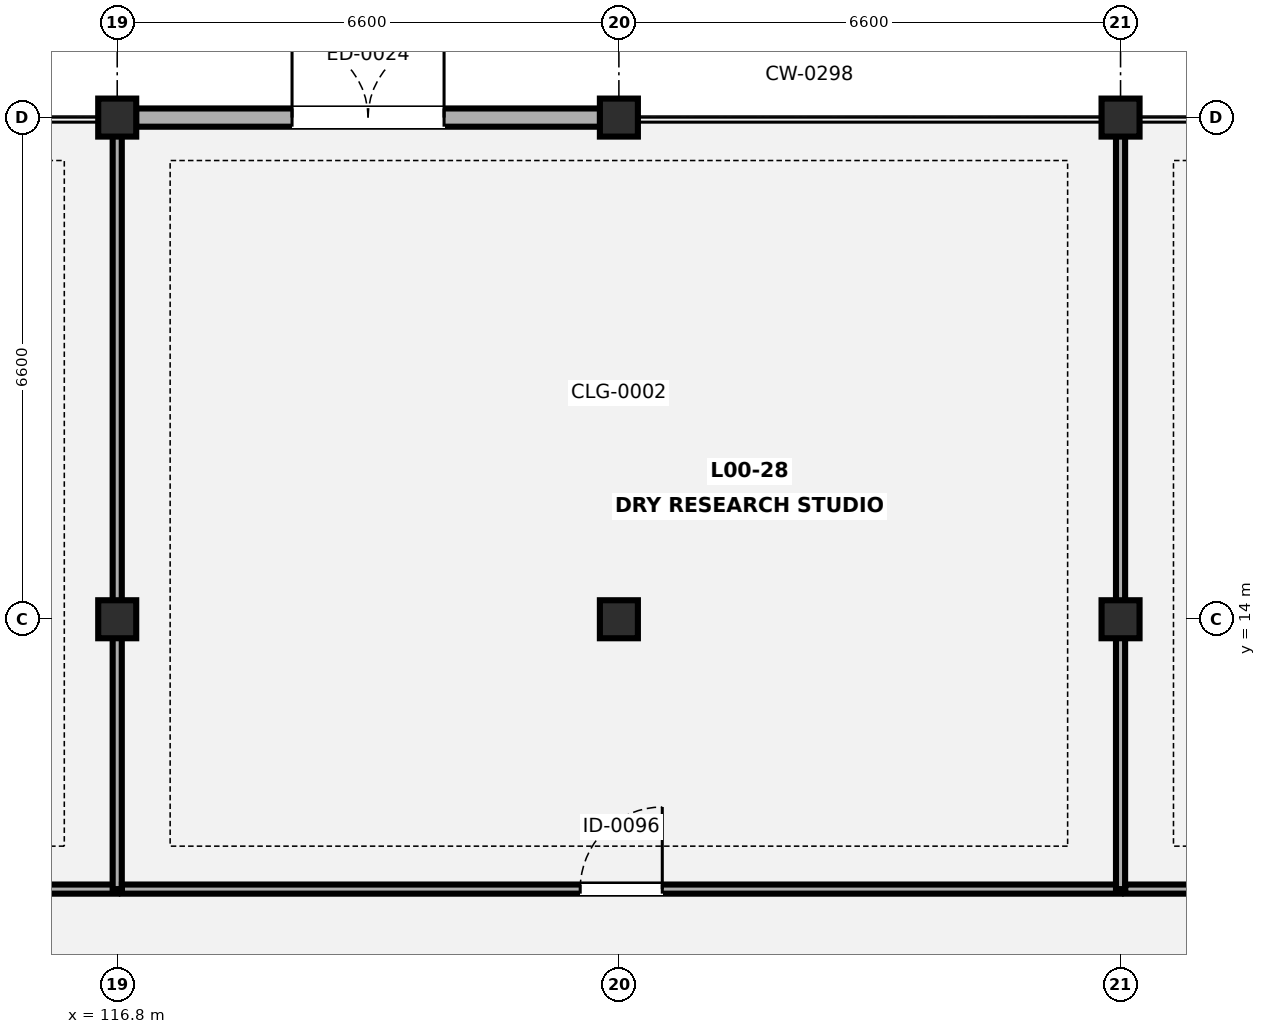
"""IFC4 building model, lengths in metres.
Left out: names, types, materials, properties, quantities, classifications, styles, units other than length and angle.
Written with IfcOpenShell. Run it as: python <this file> out.ifc"""

import sys

from ifc_helpers import new_model, si_unit, direction, frame, frame_2d, origin, origin_2d, place, context, subcontext, project, spatial, rectangle, i_section, extrude, element, fill, save


model = new_model("IFC4")
c1 = context("Model", 3, precision=1e-05, world=origin(), true_north=direction((0.0, 1.0)))
c2 = subcontext(c1, "Body", "Model", "MODEL_VIEW")
j1 = project(units=[si_unit("LENGTHUNIT", "METRE"), si_unit("PLANEANGLEUNIT", "RADIAN")], contexts=[c1])
p1 = place(None, origin())
s1 = spatial("IfcSite", under=j1, at=p1, CompositionType="ELEMENT")
p2 = place(p1, origin())
s2 = spatial("IfcBuilding", under=s1, at=p2, CompositionType="ELEMENT")
p3 = place(p2, origin())
s3 = spatial("IfcBuildingStorey", under=s2, at=p3, CompositionType="ELEMENT", Elevation=0.0)
for number, where, z_axis, x_axis in (
    (1, (116.8, 14.0, 0.0), (0.0, 0.0, 1.0), (1.0, 0.0, 0.0)),
    (2, (116.8, 20.6, 0.0), (0.0, 0.0, 1.0), (1.0, 0.0, 0.0)),
    (3, (123.4, 14.0, 0.0), (0.0, 0.0, 1.0), (1.0, 0.0, 0.0)),
    (4, (123.4, 20.6, 0.0), (0.0, 0.0, 1.0), (1.0, 0.0, 0.0)),
    (5, (130.0, 14.0, 0.0), (0.0, 0.0, 1.0), (1.0, 0.0, 0.0)),
    (6, (130.0, 20.6, 0.0), (0.0, 0.0, 1.0), (1.0, 0.0, 0.0)),
):
    element("IfcColumn", number, at=place(p3, frame(where, z_axis=z_axis, x_axis=x_axis)), inside=s3, PredefinedType="COLUMN", context=c2, shape_type="SweptSolid", body=[
        extrude(i_section(OverallWidth=0.5, OverallDepth=0.5, WebThickness=0.022, FlangeThickness=0.04, FilletRadius=0.016, at=origin_2d()), origin(), (0.0, 0.0, 1.0), 4.9),
    ])
p4 = place(p3, frame((117.048, 20.6, 0.0), z_axis=(0.0, 0.0, 1.0), x_axis=(1.0, 0.0, 0.0)))
e7 = element("IfcWall", 7, at=p4, inside=s3, PredefinedType="SOLIDWALL", context=c2, shape_type="SweptSolid", body=[
    extrude(rectangle(XDim=6.104, YDim=0.24, at=frame_2d((3.052, 0.0))), origin(), (0.0, 0.0, 1.0), 4.205),
])
p5 = place(p4, frame((2.052, 0.0, 0.0)))
e8 = element("IfcOpeningElement", 8, at=p5, cuts=e7, PredefinedType="OPENING", context=c2, shape_type="SweptSolid", body=[
    extrude(rectangle(XDim=2.0, YDim=2.25, at=frame_2d((1.0, 1.125))), frame((0.0, 0.13, 0.0), z_axis=(0.0, -1.0, 0.0), x_axis=(1.0, 0.0, 0.0)), (0.0, 0.0, 1.0), 0.26),
])
p6 = place(p3, frame((103.6, 10.45, 0.0), z_axis=(0.0, 0.0, 1.0), x_axis=(1.0, 0.0, 0.0)))
e9 = element("IfcWall", 9, at=p6, inside=s3, PredefinedType="PARTITIONING", context=c2, shape_type="SweptSolid", body=[
    extrude(rectangle(XDim=13.2, YDim=0.12, at=frame_2d((6.6, 0.0))), origin(), (0.0, 0.0, 1.0), 4.246),
])
p7 = place(p6, frame((6.125, 0.0, 0.0)))
e10 = element("IfcOpeningElement", 10, at=p7, cuts=e9, PredefinedType="OPENING", context=c2, shape_type="SweptSolid", body=[
    extrude(rectangle(XDim=0.95, YDim=2.1, at=frame_2d((0.475, 1.05))), frame((0.0, 0.07, 0.0), z_axis=(0.0, -1.0, 0.0), x_axis=(1.0, 0.0, 0.0)), (0.0, 0.0, 1.0), 0.14),
])
p8 = place(p3, frame((116.8, 10.45, 0.0), z_axis=(0.0, 0.0, 1.0), x_axis=(0.0, 1.0, 0.0)))
e11 = element("IfcWall", 11, at=p8, inside=s3, PredefinedType="PARTITIONING", context=c2, shape_type="SweptSolid", body=[
    extrude(rectangle(XDim=10.028, YDim=0.12, at=frame_2d((5.014, 0.0))), origin(), (0.0, 0.0, 1.0), 4.072),
])
p9 = place(p3, frame((116.862, 10.45, 0.0), z_axis=(0.0, 0.0, 1.0), x_axis=(1.0, 0.0, 0.0)))
e12 = element("IfcWall", 12, at=p9, inside=s3, PredefinedType="PARTITIONING", context=c2, shape_type="SweptSolid", body=[
    extrude(rectangle(XDim=13.138, YDim=0.12, at=frame_2d((6.569, 0.0))), origin(), (0.0, 0.0, 1.0), 4.246),
])
p10 = place(p9, frame((6.029, 0.0, 0.0)))
e13 = element("IfcOpeningElement", 13, at=p10, cuts=e12, PredefinedType="OPENING", context=c2, shape_type="SweptSolid", body=[
    extrude(rectangle(XDim=1.08, YDim=2.12, at=frame_2d((0.54, 1.06))), frame((0.0, 0.07, 0.0), z_axis=(0.0, -1.0, 0.0), x_axis=(1.0, 0.0, 0.0)), (0.0, 0.0, 1.0), 0.14),
])
p11 = place(p3, frame((130.0, 10.45, 0.0), z_axis=(0.0, 0.0, 1.0), x_axis=(0.0, 1.0, 0.0)))
e14 = element("IfcWall", 14, at=p11, inside=s3, PredefinedType="PARTITIONING", context=c2, shape_type="SweptSolid", body=[
    extrude(rectangle(XDim=10.15, YDim=0.12, at=frame_2d((5.075, 0.0))), origin(), (0.0, 0.0, 1.0), 4.072),
])
p12 = place(p3, frame((130.062, 10.45, 0.0), z_axis=(0.0, 0.0, 1.0), x_axis=(1.0, 0.0, 0.0)))
e15 = element("IfcWall", 15, at=p12, inside=s3, PredefinedType="PARTITIONING", context=c2, shape_type="SweptSolid", body=[
    extrude(rectangle(XDim=13.138, YDim=0.12, at=frame_2d((6.569, 0.0))), origin(), (0.0, 0.0, 1.0), 4.246),
])
p13 = place(p12, frame((5.844, 0.0, 0.0)))
e16 = element("IfcOpeningElement", 16, at=p13, cuts=e15, PredefinedType="OPENING", context=c2, shape_type="SweptSolid", body=[
    extrude(rectangle(XDim=1.45, YDim=2.12, at=frame_2d((0.725, 1.06))), frame((0.0, 0.07, 0.0), z_axis=(0.0, -1.0, 0.0), x_axis=(1.0, 0.0, 0.0)), (0.0, 0.0, 1.0), 0.14),
])
p14 = place(p5, origin())
e17 = element("IfcDoor", 17, at=p14, inside=s3, OperationType="DOUBLE_DOOR_SINGLE_SWING", PredefinedType="DOOR", context=c2, shape_type="SweptSolid", body=[
    extrude(rectangle(XDim=2.0, YDim=2.25, at=frame_2d((1.0, 1.125))), frame((0.0, 0.025, 0.0), z_axis=(0.0, -1.0, 0.0), x_axis=(1.0, 0.0, 0.0)), (0.0, 0.0, 1.0), 0.05),
])
fill(e8, e17)
p15 = place(p10, origin())
e18 = element("IfcDoor", 18, at=p15, inside=s3, OperationType="SINGLE_SWING_RIGHT", PredefinedType="DOOR", context=c2, shape_type="SweptSolid", body=[
    extrude(rectangle(XDim=1.08, YDim=2.12, at=frame_2d((0.54, 1.06))), frame((0.0, 0.025, 0.0), z_axis=(0.0, -1.0, 0.0), x_axis=(1.0, 0.0, 0.0)), (0.0, 0.0, 1.0), 0.05),
])
fill(e13, e18)
save(model, sys.argv[1])
